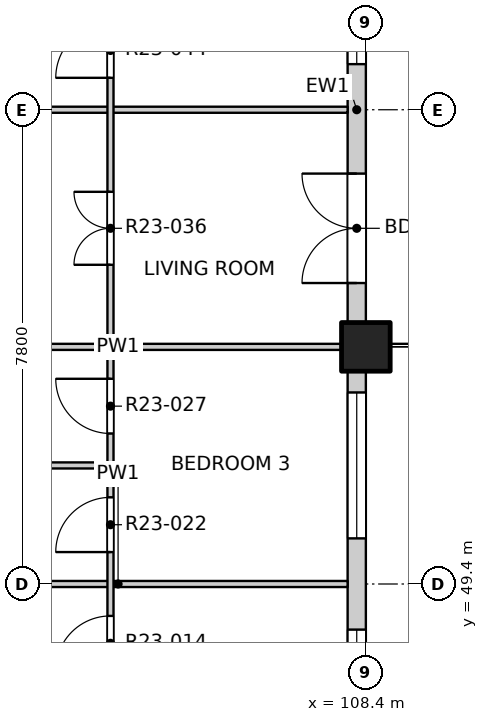
"""IFC4 building model, lengths in metres.
Left out: names, types, materials, properties, quantities, classifications, styles, units other than length and angle.
Written with IfcOpenShell. Run it as: python <this file> out.ifc"""

import sys

from ifc_helpers import new_model, si_unit, direction, frame, frame_2d, origin, origin_2d, place, context, subcontext, project, spatial, rectangle, extrude, element, fill, save


model = new_model("IFC4")
c1 = context("Model", 3, precision=1e-05, world=origin(), true_north=direction((0.0, 1.0)))
c2 = subcontext(c1, "Body", "Model", "MODEL_VIEW")
j1 = project(units=[si_unit("LENGTHUNIT", "METRE"), si_unit("PLANEANGLEUNIT", "RADIAN")], contexts=[c1])
p1 = place(None, origin())
s1 = spatial("IfcSite", under=j1, at=p1, CompositionType="ELEMENT")
p2 = place(p1, origin())
s2 = spatial("IfcBuilding", under=s1, at=p2, CompositionType="ELEMENT")
p3 = place(p2, frame((0.0, 0.0, 238.1)))
s3 = spatial("IfcBuildingStorey", under=s2, at=p3, CompositionType="ELEMENT", Elevation=238.1)
p4 = place(p3, frame((108.4, 53.3, -0.25), z_axis=(0.0, 0.0, 1.0), x_axis=(1.0, 0.0, 0.0)))
e1 = element("IfcColumn", 1, at=p4, inside=s3, PredefinedType="COLUMN", context=c2, shape_type="SweptSolid", body=[
    extrude(rectangle(XDim=0.8, YDim=0.8, at=origin_2d()), origin(), (0.0, 0.0, 1.0), 3.35),
])
p5 = place(p3, frame((108.25, 45.5, 0.0), z_axis=(0.0, 0.0, 1.0), x_axis=(0.0, 1.0, 0.0)))
e2 = element("IfcWall", 2, at=p5, inside=s3, PredefinedType="SOLIDWALL", context=c2, shape_type="SweptSolid", body=[
    extrude(rectangle(XDim=7.4, YDim=0.3, at=frame_2d((3.7, 0.0))), origin(), (0.0, 0.0, 1.0), 3.1),
])
p6 = place(p5, frame((0.75, 0.0, 0.9)))
e3 = element("IfcOpeningElement", 3, at=p6, cuts=e2, PredefinedType="OPENING", context=c2, shape_type="SweptSolid", body=[
    extrude(rectangle(XDim=2.4, YDim=1.8, at=frame_2d((1.2, 0.9))), frame((0.0, 0.16, 0.0), z_axis=(0.0, -1.0, 0.0), x_axis=(1.0, 0.0, 0.0)), (0.0, 0.0, 1.0), 0.32),
])
p7 = place(p5, frame((4.65, 0.0, 0.9)))
e4 = element("IfcOpeningElement", 4, at=p7, cuts=e2, PredefinedType="OPENING", context=c2, shape_type="SweptSolid", body=[
    extrude(rectangle(XDim=2.4, YDim=1.8, at=frame_2d((1.2, 0.9))), frame((0.0, 0.16, 0.0), z_axis=(0.0, -1.0, 0.0), x_axis=(1.0, 0.0, 0.0)), (0.0, 0.0, 1.0), 0.32),
])
p8 = place(p3, frame((108.25, 53.7, 0.0), z_axis=(0.0, 0.0, 1.0), x_axis=(0.0, 1.0, 0.0)))
e5 = element("IfcWall", 5, at=p8, inside=s3, PredefinedType="SOLIDWALL", context=c2, shape_type="SweptSolid", body=[
    extrude(rectangle(XDim=7.0, YDim=0.3, at=frame_2d((3.5, 0.0))), origin(), (0.0, 0.0, 1.0), 3.1),
])
p9 = place(p8, frame((0.65, 0.0, 0.0)))
e6 = element("IfcOpeningElement", 6, at=p9, cuts=e5, PredefinedType="OPENING", context=c2, shape_type="SweptSolid", body=[
    extrude(rectangle(XDim=1.8, YDim=2.4, at=frame_2d((0.9, 1.2))), frame((0.0, 0.16, 0.0), z_axis=(0.0, -1.0, 0.0), x_axis=(1.0, 0.0, 0.0)), (0.0, 0.0, 1.0), 0.32),
])
p10 = place(p8, frame((4.25, 0.0, 0.9)))
e7 = element("IfcOpeningElement", 7, at=p10, cuts=e5, PredefinedType="OPENING", context=c2, shape_type="SweptSolid", body=[
    extrude(rectangle(XDim=2.4, YDim=1.8, at=frame_2d((1.2, 0.9))), frame((0.0, 0.16, 0.0), z_axis=(0.0, -1.0, 0.0), x_axis=(1.0, 0.0, 0.0)), (0.0, 0.0, 1.0), 0.32),
])
p11 = place(p3, frame((100.55, 49.4, 0.0), z_axis=(0.0, 0.0, 1.0), x_axis=(1.0, 0.0, 0.0)))
e8 = element("IfcWall", 8, at=p11, inside=s3, PredefinedType="PARTITIONING", context=c2, shape_type="SweptSolid", body=[
    extrude(rectangle(XDim=7.55, YDim=0.1, at=frame_2d((3.775, 0.0))), origin(), (0.0, 0.0, 1.0), 3.1),
])
p12 = place(p3, frame((100.55, 51.35, 0.0), z_axis=(0.0, 0.0, 1.0), x_axis=(1.0, 0.0, 0.0)))
e9 = element("IfcWall", 9, at=p12, inside=s3, PredefinedType="PARTITIONING", context=c2, shape_type="SweptSolid", body=[
    extrude(rectangle(XDim=3.7, YDim=0.1, at=frame_2d((1.85, 0.0))), origin(), (0.0, 0.0, 1.0), 3.1),
])
for number, where, z_axis, x_axis in (
    (10, (100.55, 53.3, 0.0), (0.0, 0.0, 1.0), (1.0, 0.0, 0.0)),
    (11, (100.55, 57.2, 0.0), (0.0, 0.0, 1.0), (1.0, 0.0, 0.0)),
):
    element("IfcWall", number, at=place(p3, frame(where, z_axis=z_axis, x_axis=x_axis)), inside=s3, PredefinedType="PARTITIONING", context=c2, shape_type="SweptSolid", body=[
        extrude(rectangle(XDim=7.55, YDim=0.1, at=frame_2d((3.775, 0.0))), origin(), (0.0, 0.0, 1.0), 3.1),
    ])
p13 = place(p3, frame((104.2, 41.9, 0.0), z_axis=(0.0, 0.0, 1.0), x_axis=(0.0, 1.0, 0.0)))
e12 = element("IfcWall", 12, at=p13, inside=s3, PredefinedType="PARTITIONING", context=c2, shape_type="SweptSolid", body=[
    extrude(rectangle(XDim=19.1, YDim=0.1, at=frame_2d((9.55, 0.0))), origin(), (0.0, 0.0, 1.0), 3.1),
])
p14 = place(p13, frame((1.05, 0.0, 0.0)))
e13 = element("IfcOpeningElement", 13, at=p14, cuts=e12, PredefinedType="OPENING", context=c2, shape_type="SweptSolid", body=[
    extrude(rectangle(XDim=1.2, YDim=2.1, at=frame_2d((0.6, 1.05))), frame((0.0, 0.06, 0.0), z_axis=(0.0, -1.0, 0.0), x_axis=(1.0, 0.0, 0.0)), (0.0, 0.0, 1.0), 0.12),
])
p15 = place(p13, frame((4.125, 0.0, 0.0)))
e14 = element("IfcOpeningElement", 14, at=p15, cuts=e12, PredefinedType="OPENING", context=c2, shape_type="SweptSolid", body=[
    extrude(rectangle(XDim=0.9, YDim=2.1, at=frame_2d((0.45, 1.05))), frame((0.0, 0.06, 0.0), z_axis=(0.0, -1.0, 0.0), x_axis=(1.0, 0.0, 0.0)), (0.0, 0.0, 1.0), 0.12),
])
p16 = place(p13, frame((6.075, 0.0, 0.0)))
e15 = element("IfcOpeningElement", 15, at=p16, cuts=e12, PredefinedType="OPENING", context=c2, shape_type="SweptSolid", body=[
    extrude(rectangle(XDim=0.9, YDim=2.1, at=frame_2d((0.45, 1.05))), frame((0.0, 0.06, 0.0), z_axis=(0.0, -1.0, 0.0), x_axis=(1.0, 0.0, 0.0)), (0.0, 0.0, 1.0), 0.12),
])
p17 = place(p13, frame((8.025, 0.0, 0.0)))
e16 = element("IfcOpeningElement", 16, at=p17, cuts=e12, PredefinedType="OPENING", context=c2, shape_type="SweptSolid", body=[
    extrude(rectangle(XDim=0.9, YDim=2.1, at=frame_2d((0.45, 1.05))), frame((0.0, 0.06, 0.0), z_axis=(0.0, -1.0, 0.0), x_axis=(1.0, 0.0, 0.0)), (0.0, 0.0, 1.0), 0.12),
])
p18 = place(p13, frame((9.975, 0.0, 0.0)))
e17 = element("IfcOpeningElement", 17, at=p18, cuts=e12, PredefinedType="OPENING", context=c2, shape_type="SweptSolid", body=[
    extrude(rectangle(XDim=0.9, YDim=2.1, at=frame_2d((0.45, 1.05))), frame((0.0, 0.06, 0.0), z_axis=(0.0, -1.0, 0.0), x_axis=(1.0, 0.0, 0.0)), (0.0, 0.0, 1.0), 0.12),
])
p19 = place(p13, frame((12.75, 0.0, 0.0)))
e18 = element("IfcOpeningElement", 18, at=p19, cuts=e12, PredefinedType="OPENING", context=c2, shape_type="SweptSolid", body=[
    extrude(rectangle(XDim=1.2, YDim=2.1, at=frame_2d((0.6, 1.05))), frame((0.0, 0.06, 0.0), z_axis=(0.0, -1.0, 0.0), x_axis=(1.0, 0.0, 0.0)), (0.0, 0.0, 1.0), 0.12),
])
p20 = place(p13, frame((15.825, 0.0, 0.0)))
e19 = element("IfcOpeningElement", 19, at=p20, cuts=e12, PredefinedType="OPENING", context=c2, shape_type="SweptSolid", body=[
    extrude(rectangle(XDim=0.9, YDim=2.1, at=frame_2d((0.45, 1.05))), frame((0.0, 0.06, 0.0), z_axis=(0.0, -1.0, 0.0), x_axis=(1.0, 0.0, 0.0)), (0.0, 0.0, 1.0), 0.12),
])
p21 = place(p13, frame((17.775, 0.0, 0.0)))
e20 = element("IfcOpeningElement", 20, at=p21, cuts=e12, PredefinedType="OPENING", context=c2, shape_type="SweptSolid", body=[
    extrude(rectangle(XDim=0.9, YDim=2.1, at=frame_2d((0.45, 1.05))), frame((0.0, 0.06, 0.0), z_axis=(0.0, -1.0, 0.0), x_axis=(1.0, 0.0, 0.0)), (0.0, 0.0, 1.0), 0.12),
])
p22 = place(p6, origin())
e21 = element("IfcWindow", 21, at=p22, inside=s3, PartitioningType="DOUBLE_PANEL_VERTICAL", PredefinedType="WINDOW", context=c2, shape_type="SweptSolid", body=[
    extrude(rectangle(XDim=2.4, YDim=1.8, at=frame_2d((1.2, 0.9))), frame((0.0, 0.03, 0.0), z_axis=(0.0, -1.0, 0.0), x_axis=(1.0, 0.0, 0.0)), (0.0, 0.0, 1.0), 0.06),
])
fill(e3, e21)
p23 = place(p7, origin())
e22 = element("IfcWindow", 22, at=p23, inside=s3, PartitioningType="DOUBLE_PANEL_VERTICAL", PredefinedType="WINDOW", context=c2, shape_type="SweptSolid", body=[
    extrude(rectangle(XDim=2.4, YDim=1.8, at=frame_2d((1.2, 0.9))), frame((0.0, 0.03, 0.0), z_axis=(0.0, -1.0, 0.0), x_axis=(1.0, 0.0, 0.0)), (0.0, 0.0, 1.0), 0.06),
])
fill(e4, e22)
p24 = place(p9, origin())
e23 = element("IfcDoor", 23, at=p24, inside=s3, OperationType="DOUBLE_DOOR_SINGLE_SWING", PredefinedType="DOOR", context=c2, shape_type="SweptSolid", body=[
    extrude(rectangle(XDim=1.8, YDim=2.4, at=frame_2d((0.9, 1.2))), frame((0.0, 0.025, 0.0), z_axis=(0.0, -1.0, 0.0), x_axis=(1.0, 0.0, 0.0)), (0.0, 0.0, 1.0), 0.05),
])
fill(e6, e23)
p25 = place(p10, origin())
e24 = element("IfcWindow", 24, at=p25, inside=s3, PartitioningType="DOUBLE_PANEL_VERTICAL", PredefinedType="WINDOW", context=c2, shape_type="SweptSolid", body=[
    extrude(rectangle(XDim=2.4, YDim=1.8, at=frame_2d((1.2, 0.9))), frame((0.0, 0.03, 0.0), z_axis=(0.0, -1.0, 0.0), x_axis=(1.0, 0.0, 0.0)), (0.0, 0.0, 1.0), 0.06),
])
fill(e7, e24)
p26 = place(p16, origin())
e25 = element("IfcDoor", 25, at=p26, inside=s3, OperationType="SINGLE_SWING_LEFT", PredefinedType="DOOR", context=c2, shape_type="SweptSolid", body=[
    extrude(rectangle(XDim=0.9, YDim=2.1, at=frame_2d((0.45, 1.05))), frame((0.0, 0.025, 0.0), z_axis=(0.0, -1.0, 0.0), x_axis=(1.0, 0.0, 0.0)), (0.0, 0.0, 1.0), 0.05),
])
fill(e15, e25)
p27 = place(p17, origin())
e26 = element("IfcDoor", 26, at=p27, inside=s3, OperationType="SINGLE_SWING_LEFT", PredefinedType="DOOR", context=c2, shape_type="SweptSolid", body=[
    extrude(rectangle(XDim=0.9, YDim=2.1, at=frame_2d((0.45, 1.05))), frame((0.0, 0.025, 0.0), z_axis=(0.0, -1.0, 0.0), x_axis=(1.0, 0.0, 0.0)), (0.0, 0.0, 1.0), 0.05),
])
fill(e16, e26)
p28 = place(p18, origin())
e27 = element("IfcDoor", 27, at=p28, inside=s3, OperationType="SINGLE_SWING_RIGHT", PredefinedType="DOOR", context=c2, shape_type="SweptSolid", body=[
    extrude(rectangle(XDim=0.9, YDim=2.1, at=frame_2d((0.45, 1.05))), frame((0.0, 0.025, 0.0), z_axis=(0.0, -1.0, 0.0), x_axis=(1.0, 0.0, 0.0)), (0.0, 0.0, 1.0), 0.05),
])
fill(e17, e27)
p29 = place(p19, origin())
e28 = element("IfcDoor", 28, at=p29, inside=s3, OperationType="DOUBLE_DOOR_SINGLE_SWING", PredefinedType="DOOR", context=c2, shape_type="SweptSolid", body=[
    extrude(rectangle(XDim=1.2, YDim=2.1, at=frame_2d((0.6, 1.05))), frame((0.0, 0.025, 0.0), z_axis=(0.0, -1.0, 0.0), x_axis=(1.0, 0.0, 0.0)), (0.0, 0.0, 1.0), 0.05),
])
fill(e18, e28)
p30 = place(p20, origin())
e29 = element("IfcDoor", 29, at=p30, inside=s3, OperationType="SINGLE_SWING_LEFT", PredefinedType="DOOR", context=c2, shape_type="SweptSolid", body=[
    extrude(rectangle(XDim=0.9, YDim=2.1, at=frame_2d((0.45, 1.05))), frame((0.0, 0.025, 0.0), z_axis=(0.0, -1.0, 0.0), x_axis=(1.0, 0.0, 0.0)), (0.0, 0.0, 1.0), 0.05),
])
fill(e19, e29)
save(model, sys.argv[1])
